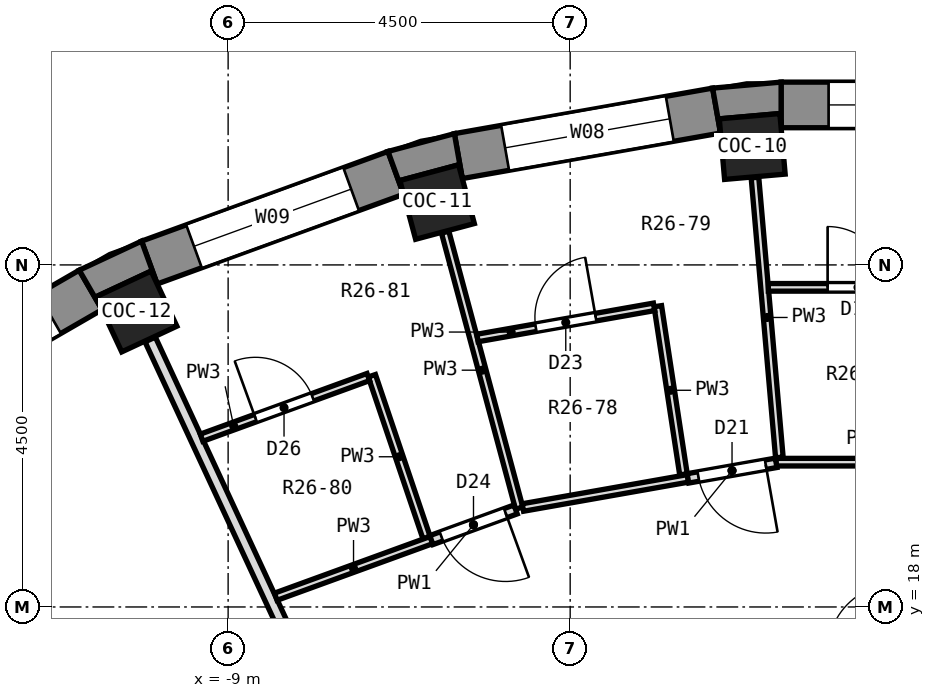
"""IFC4 building model, lengths in metres.
Left out: names, types, materials, properties, quantities, classifications, styles, units other than length and angle.
Written with IfcOpenShell. Run it as: python <this file> out.ifc"""

import sys

from ifc_helpers import new_model, si_unit, direction, frame, frame_2d, origin, origin_2d, place, context, subcontext, project, spatial, polyline, rectangle, outline, extrude, element, fill, save


model = new_model("IFC4")
c1 = context("Model", 3, precision=1e-05, world=origin(), true_north=direction((0.0, 1.0)))
c2 = subcontext(c1, "Body", "Model", "MODEL_VIEW")
j1 = project(units=[si_unit("LENGTHUNIT", "METRE"), si_unit("PLANEANGLEUNIT", "RADIAN")], contexts=[c1])
p1 = place(None, origin())
s1 = spatial("IfcSite", under=j1, at=p1, CompositionType="ELEMENT")
p2 = place(p1, origin())
s2 = spatial("IfcBuilding", under=s1, at=p2, CompositionType="ELEMENT")
p3 = place(p2, frame((0.0, 0.0, 170.7)))
s3 = spatial("IfcBuildingStorey", under=s2, at=p3, CompositionType="ELEMENT", Elevation=170.7)
for number, where, z_axis, x_axis in (
    (1, (-2.105, 24.058, 0.0), (0.0, 0.0, 1.0), (-0.087, 0.996, 0.0)),
    (2, (-6.25, 23.327, 0.0), (0.0, 0.0, 1.0), (-0.259, 0.966, 0.0)),
    (3, (-10.206, 21.887, 0.0), (0.0, 0.0, 1.0), (-0.423, 0.906, 0.0)),
):
    element("IfcColumn", number, at=place(p3, frame(where, z_axis=z_axis, x_axis=x_axis)), inside=s3, PredefinedType="COLUMN", context=c2, shape_type="SweptSolid", body=[
        extrude(rectangle(XDim=0.8, YDim=0.8, at=origin_2d()), origin(), (0.0, 0.0, 1.0), 3.3),
    ])
p4 = place(p3, frame((1.725, 24.605, 0.0), z_axis=(0.0, 0.0, 1.0), x_axis=(-1.0, 0.0, 0.0)))
e4 = element("IfcWall", 4, at=p4, inside=s3, PredefinedType="SOLIDWALL", context=c2, shape_type="SweptSolid", body=[
    extrude(rectangle(XDim=3.45, YDim=0.6, at=frame_2d((1.725, 0.0))), origin(), (0.0, 0.0, 1.0), 2.85),
])
p5 = place(p4, frame((0.625, 0.0, 0.9)))
e5 = element("IfcOpeningElement", 5, at=p5, cuts=e4, PredefinedType="OPENING", context=c2, shape_type="SweptSolid", body=[
    extrude(rectangle(XDim=2.2, YDim=1.8, at=frame_2d((1.1, 0.9))), frame((0.0, 0.312, 0.0), z_axis=(0.0, -1.0, 0.0), x_axis=(1.0, 0.0, 0.0)), (0.0, 0.0, 1.0), 0.624),
])
p6 = place(p3, frame((-2.574, 24.531, 0.0), z_axis=(0.0, 0.0, 1.0), x_axis=(-0.984814892183, -0.173607684551, 0.0)))
e6 = element("IfcWall", 6, at=p6, inside=s3, PredefinedType="SOLIDWALL", context=c2, shape_type="SweptSolid", body=[
    extrude(rectangle(XDim=3.45, YDim=0.6, at=frame_2d((1.725, 0.0))), origin(), (0.0, 0.0, 1.0), 2.85),
])
p7 = place(p6, frame((0.625, 0.0, 0.9)))
e7 = element("IfcOpeningElement", 7, at=p7, cuts=e6, PredefinedType="OPENING", context=c2, shape_type="SweptSolid", body=[
    extrude(rectangle(XDim=2.2, YDim=1.8, at=frame_2d((1.1, 0.9))), frame((0.0, 0.312, 0.0), z_axis=(0.0, -1.0, 0.0), x_axis=(1.0, 0.0, 0.0)), (0.0, 0.0, 1.0), 0.624),
])
p8 = place(p3, frame((-6.794, 23.711, 0.0), z_axis=(0.0, 0.0, 1.0), x_axis=(-0.93968799822, -0.342032843455, 0.0)))
e8 = element("IfcWall", 8, at=p8, inside=s3, PredefinedType="SOLIDWALL", context=c2, shape_type="SweptSolid", body=[
    extrude(rectangle(XDim=3.45, YDim=0.6, at=frame_2d((1.725, 0.0))), origin(), (0.0, 0.0, 1.0), 2.85),
])
p9 = place(p8, frame((0.625, 0.0, 0.9)))
e9 = element("IfcOpeningElement", 9, at=p9, cuts=e8, PredefinedType="OPENING", context=c2, shape_type="SweptSolid", body=[
    extrude(rectangle(XDim=2.2, YDim=1.8, at=frame_2d((1.1, 0.9))), frame((0.0, 0.312, 0.0), z_axis=(0.0, -1.0, 0.0), x_axis=(1.0, 0.0, 0.0)), (0.0, 0.0, 1.0), 0.624),
])
p10 = place(p3, frame((-10.809, 22.171, 0.0), z_axis=(0.0, 0.0, 1.0), x_axis=(-0.86602648383, -0.499998129301, 0.0)))
e10 = element("IfcWall", 10, at=p10, inside=s3, PredefinedType="SOLIDWALL", context=c2, shape_type="SweptSolid", body=[
    extrude(rectangle(XDim=3.45, YDim=0.6, at=frame_2d((1.725, 0.0))), origin(), (0.0, 0.0, 1.0), 2.85),
])
p11 = place(p10, frame((0.625, 0.0, 0.9)))
e11 = element("IfcOpeningElement", 11, at=p11, cuts=e10, PredefinedType="OPENING", context=c2, shape_type="SweptSolid", body=[
    extrude(rectangle(XDim=2.2, YDim=1.8, at=frame_2d((1.1, 0.9))), frame((0.0, 0.312, 0.0), z_axis=(0.0, -1.0, 0.0), x_axis=(1.0, 0.0, 0.0)), (0.0, 0.0, 1.0), 0.624),
])
p12 = place(p3, origin())
e12 = element("IfcWall", 12, at=p12, inside=s3, PredefinedType="SOLIDWALL", context=c2, shape_type="SweptSolid", body=[
    extrude(outline(polyline([(-1.725, 24.905), (-2.626, 24.826), (-2.522, 24.235), (-2.538, 24.422), (-1.741, 24.491), (-1.725, 24.305), (-1.725, 24.905)])), origin(), (0.0, 0.0, 1.0), 2.85),
])
p13 = place(p3, origin())
e13 = element("IfcWall", 13, at=p13, inside=s3, PredefinedType="SOLIDWALL", context=c2, shape_type="SweptSolid", body=[
    extrude(outline(polyline([(-6.023, 24.227), (-6.897, 23.993), (-6.692, 23.429), (-6.74, 23.61), (-5.968, 23.817), (-5.919, 23.636), (-6.023, 24.227)])), origin(), (0.0, 0.0, 1.0), 2.85),
])
p14 = place(p3, origin())
e14 = element("IfcWall", 14, at=p14, inside=s3, PredefinedType="SOLIDWALL", context=c2, shape_type="SweptSolid", body=[
    extrude(outline(polyline([(-10.959, 22.431), (-10.659, 21.911), (-10.738, 22.081), (-10.013, 22.419), (-9.934, 22.249), (-10.139, 22.813), (-10.959, 22.431)])), origin(), (0.0, 0.0, 1.0), 2.85),
])
p15 = place(p3, frame((-2.069, 23.65, 0.0), z_axis=(0.0, 0.0, 1.0), x_axis=(0.086783514493, -0.996227193773, 0.0)))
e15 = element("IfcWall", 15, at=p15, inside=s3, PredefinedType="PARTITIONING", context=c2, shape_type="SweptSolid", body=[
    extrude(rectangle(XDim=3.697, YDim=0.1, at=frame_2d((1.848, 0.0))), origin(), (0.0, 0.0, 1.0), 2.85),
])
p16 = place(p3, frame((-3.347, 21.957, 0.0), z_axis=(0.0, 0.0, 1.0), x_axis=(0.150778111259, -0.988567631053, 0.0)))
e16 = element("IfcWall", 16, at=p16, inside=s3, PredefinedType="PARTITIONING", context=c2, shape_type="SweptSolid", body=[
    extrude(rectangle(XDim=2.238, YDim=0.1, at=frame_2d((1.119, 0.0))), origin(), (0.0, 0.0, 1.0), 2.85),
])
p17 = place(p3, frame((-6.145, 22.931, 0.0), z_axis=(0.0, 0.0, 1.0), x_axis=(0.259065026248, -0.965859882268, 0.0)))
e17 = element("IfcWall", 17, at=p17, inside=s3, PredefinedType="PARTITIONING", context=c2, shape_type="SweptSolid", body=[
    extrude(rectangle(XDim=3.759, YDim=0.1, at=frame_2d((1.88, 0.0))), origin(), (0.0, 0.0, 1.0), 2.85),
])
p18 = place(p3, frame((-7.109, 21.042, 0.0), z_axis=(0.0, 0.0, 1.0), x_axis=(0.320001473527, -0.947417044886, 0.0)))
e18 = element("IfcWall", 18, at=p18, inside=s3, PredefinedType="PARTITIONING", context=c2, shape_type="SweptSolid", body=[
    extrude(rectangle(XDim=2.25, YDim=0.1, at=frame_2d((1.125, 0.0))), origin(), (0.0, 0.0, 1.0), 2.85),
])
p19 = place(p3, frame((-10.026, 21.519, 0.0), z_axis=(0.0, 0.0, 1.0), x_axis=(0.420738120606, -0.907182139302, 0.0)))
e19 = element("IfcWall", 19, at=p19, inside=s3, PredefinedType="PARTITIONING", context=c2, shape_type="SweptSolid", body=[
    extrude(rectangle(XDim=8.42, YDim=0.15, at=frame_2d((4.21, 0.0))), origin(), (0.0, 0.0, 1.0), 2.85),
])
p20 = place(p3, frame((-1.792, 19.905, 0.0), z_axis=(0.0, 0.0, 1.0), x_axis=(1.0, 0.0, 0.0)))
e20 = element("IfcWall", 20, at=p20, inside=s3, PredefinedType="PARTITIONING", context=c2, shape_type="SweptSolid", body=[
    extrude(rectangle(XDim=2.305, YDim=0.1, at=frame_2d((1.152, 0.0))), origin(), (0.0, 0.0, 1.0), 2.85),
])
p21 = place(p3, frame((-1.893, 22.205, 0.0), z_axis=(0.0, 0.0, 1.0), x_axis=(1.0, 0.0, 0.0)))
e21 = element("IfcWall", 21, at=p21, inside=s3, PredefinedType="PARTITIONING", context=c2, shape_type="SweptSolid", body=[
    extrude(rectangle(XDim=2.41, YDim=0.1, at=frame_2d((1.205, 0.0))), origin(), (0.0, 0.0, 1.0), 2.85),
])
p22 = place(p21, frame((0.78, 0.0, 0.0)))
e22 = element("IfcOpeningElement", 22, at=p22, cuts=e21, PredefinedType="OPENING", context=c2, shape_type="SweptSolid", body=[
    extrude(rectangle(XDim=0.8, YDim=2.1, at=frame_2d((0.4, 1.05))), frame((0.0, 0.062, 0.0), z_axis=(0.0, -1.0, 0.0), x_axis=(1.0, 0.0, 0.0)), (0.0, 0.0, 1.0), 0.124),
])
p23 = place(p3, frame((-5.122, 19.309, 0.0), z_axis=(0.0, 0.0, 1.0), x_axis=(0.984790246942, 0.173747430277, 0.0)))
e23 = element("IfcWall", 23, at=p23, inside=s3, PredefinedType="PARTITIONING", context=c2, shape_type="SweptSolid", body=[
    extrude(rectangle(XDim=2.205, YDim=0.1, at=frame_2d((1.102, 0.0))), origin(), (0.0, 0.0, 1.0), 2.85),
])
p24 = place(p3, frame((-2.951, 19.692, 0.0), z_axis=(0.0, 0.0, 1.0), x_axis=(0.984810663307, 0.173631671755, 0.0)))
e24 = element("IfcWall", 24, at=p24, inside=s3, PredefinedType="PARTITIONING", context=c2, shape_type="SweptSolid", body=[
    extrude(rectangle(XDim=1.178, YDim=0.125, at=frame_2d((0.589, 0.0))), origin(), (0.0, 0.0, 1.0), 2.85),
])
p25 = place(p24, frame((0.139, 0.0, 0.0)))
e25 = element("IfcOpeningElement", 25, at=p25, cuts=e24, PredefinedType="OPENING", context=c2, shape_type="SweptSolid", body=[
    extrude(rectangle(XDim=0.9, YDim=2.1, at=frame_2d((0.45, 1.05))), frame((0.0, 0.074, 0.0), z_axis=(0.0, -1.0, 0.0), x_axis=(1.0, 0.0, 0.0)), (0.0, 0.0, 1.0), 0.149),
])
p26 = place(p3, frame((-5.72, 21.539, 0.0), z_axis=(0.0, 0.0, 1.0), x_axis=(0.984809591131, 0.173637752855, 0.0)))
e26 = element("IfcWall", 26, at=p26, inside=s3, PredefinedType="PARTITIONING", context=c2, shape_type="SweptSolid", body=[
    extrude(rectangle(XDim=2.359, YDim=0.1, at=frame_2d((1.18, 0.0))), origin(), (0.0, 0.0, 1.0), 2.85),
])
p27 = place(p26, frame((0.78, 0.0, 0.0)))
e27 = element("IfcOpeningElement", 27, at=p27, cuts=e26, PredefinedType="OPENING", context=c2, shape_type="SweptSolid", body=[
    extrude(rectangle(XDim=0.8, YDim=2.1, at=frame_2d((0.4, 1.05))), frame((0.0, 0.062, 0.0), z_axis=(0.0, -1.0, 0.0), x_axis=(1.0, 0.0, 0.0)), (0.0, 0.0, 1.0), 0.124),
])
p28 = place(p3, frame((-8.374, 18.135, 0.0), z_axis=(0.0, 0.0, 1.0), x_axis=(0.939750886848, 0.341860016189, 0.0)))
e28 = element("IfcWall", 28, at=p28, inside=s3, PredefinedType="PARTITIONING", context=c2, shape_type="SweptSolid", body=[
    extrude(rectangle(XDim=2.179, YDim=0.1, at=frame_2d((1.089, 0.0))), origin(), (0.0, 0.0, 1.0), 2.85),
])
p29 = place(p3, frame((-6.326, 18.88, 0.0), z_axis=(0.0, 0.0, 1.0), x_axis=(0.939672449317, 0.342075558896, 0.0)))
e29 = element("IfcWall", 29, at=p29, inside=s3, PredefinedType="PARTITIONING", context=c2, shape_type="SweptSolid", body=[
    extrude(rectangle(XDim=1.179, YDim=0.125, at=frame_2d((0.589, 0.0))), origin(), (0.0, 0.0, 1.0), 2.85),
])
p30 = place(p29, frame((0.139, 0.0, 0.0)))
e30 = element("IfcOpeningElement", 30, at=p30, cuts=e29, PredefinedType="OPENING", context=c2, shape_type="SweptSolid", body=[
    extrude(rectangle(XDim=0.9, YDim=2.1, at=frame_2d((0.45, 1.05))), frame((0.0, 0.074, 0.0), z_axis=(0.0, -1.0, 0.0), x_axis=(1.0, 0.0, 0.0)), (0.0, 0.0, 1.0), 0.149),
])
p31 = place(p3, frame((-9.35, 20.227, 0.0), z_axis=(0.0, 0.0, 1.0), x_axis=(0.939701781882, 0.341994972371, 0.0)))
e31 = element("IfcWall", 31, at=p31, inside=s3, PredefinedType="PARTITIONING", context=c2, shape_type="SweptSolid", body=[
    extrude(rectangle(XDim=2.334, YDim=0.1, at=frame_2d((1.167, 0.0))), origin(), (0.0, 0.0, 1.0), 2.85),
])
p32 = place(p31, frame((0.755, 0.0, 0.0)))
e32 = element("IfcOpeningElement", 32, at=p32, cuts=e31, PredefinedType="OPENING", context=c2, shape_type="SweptSolid", body=[
    extrude(rectangle(XDim=0.8, YDim=2.1, at=frame_2d((0.4, 1.05))), frame((0.0, 0.062, 0.0), z_axis=(0.0, -1.0, 0.0), x_axis=(1.0, 0.0, 0.0)), (0.0, 0.0, 1.0), 0.124),
])
p33 = place(p5, origin())
e33 = element("IfcWindow", 33, at=p33, inside=s3, PartitioningType="SINGLE_PANEL", PredefinedType="WINDOW", context=c2, shape_type="SweptSolid", body=[
    extrude(rectangle(XDim=2.2, YDim=1.8, at=frame_2d((1.1, 0.9))), frame((0.0, 0.18, 0.0), z_axis=(0.0, -1.0, 0.0), x_axis=(1.0, 0.0, 0.0)), (0.0, 0.0, 1.0), 0.06),
])
fill(e5, e33)
p34 = place(p7, origin())
e34 = element("IfcWindow", 34, at=p34, inside=s3, PartitioningType="SINGLE_PANEL", PredefinedType="WINDOW", context=c2, shape_type="SweptSolid", body=[
    extrude(rectangle(XDim=2.2, YDim=1.8, at=frame_2d((1.1, 0.9))), frame((0.0, 0.18, 0.0), z_axis=(0.0, -1.0, 0.0), x_axis=(1.0, 0.0, 0.0)), (0.0, 0.0, 1.0), 0.06),
])
fill(e7, e34)
p35 = place(p9, origin())
e35 = element("IfcWindow", 35, at=p35, inside=s3, PartitioningType="SINGLE_PANEL", PredefinedType="WINDOW", context=c2, shape_type="SweptSolid", body=[
    extrude(rectangle(XDim=2.2, YDim=1.8, at=frame_2d((1.1, 0.9))), frame((0.0, 0.18, 0.0), z_axis=(0.0, -1.0, 0.0), x_axis=(1.0, 0.0, 0.0)), (0.0, 0.0, 1.0), 0.06),
])
fill(e9, e35)
p36 = place(p11, origin())
e36 = element("IfcWindow", 36, at=p36, inside=s3, PartitioningType="SINGLE_PANEL", PredefinedType="WINDOW", context=c2, shape_type="SweptSolid", body=[
    extrude(rectangle(XDim=2.2, YDim=1.8, at=frame_2d((1.1, 0.9))), frame((0.0, 0.18, 0.0), z_axis=(0.0, -1.0, 0.0), x_axis=(1.0, 0.0, 0.0)), (0.0, 0.0, 1.0), 0.06),
])
fill(e11, e36)
p37 = place(p22, origin())
e37 = element("IfcDoor", 37, at=p37, inside=s3, OperationType="SINGLE_SWING_LEFT", PredefinedType="DOOR", context=c2, shape_type="SweptSolid", body=[
    extrude(rectangle(XDim=0.8, YDim=2.1, at=frame_2d((0.4, 1.05))), frame((0.0, 0.025, 0.0), z_axis=(0.0, -1.0, 0.0), x_axis=(1.0, 0.0, 0.0)), (0.0, 0.0, 1.0), 0.05),
])
fill(e22, e37)
p38 = place(p25, frame((0.9, 0.0, 0.0), z_axis=(0.0, 0.0, 1.0), x_axis=(-1.0, 0.0, 0.0)))
e38 = element("IfcDoor", 38, at=p38, inside=s3, OperationType="SINGLE_SWING_LEFT", PredefinedType="DOOR", context=c2, shape_type="SweptSolid", body=[
    extrude(rectangle(XDim=0.9, YDim=2.1, at=frame_2d((0.45, 1.05))), frame((0.0, 0.025, 0.0), z_axis=(0.0, -1.0, 0.0), x_axis=(1.0, 0.0, 0.0)), (0.0, 0.0, 1.0), 0.05),
])
fill(e25, e38)
p39 = place(p27, origin())
e39 = element("IfcDoor", 39, at=p39, inside=s3, OperationType="SINGLE_SWING_RIGHT", PredefinedType="DOOR", context=c2, shape_type="SweptSolid", body=[
    extrude(rectangle(XDim=0.8, YDim=2.1, at=frame_2d((0.4, 1.05))), frame((0.0, 0.025, 0.0), z_axis=(0.0, -1.0, 0.0), x_axis=(1.0, 0.0, 0.0)), (0.0, 0.0, 1.0), 0.05),
])
fill(e27, e39)
p40 = place(p30, frame((0.9, 0.0, 0.0), z_axis=(0.0, 0.0, 1.0), x_axis=(-1.0, 0.0, 0.0)))
e40 = element("IfcDoor", 40, at=p40, inside=s3, OperationType="SINGLE_SWING_LEFT", PredefinedType="DOOR", context=c2, shape_type="SweptSolid", body=[
    extrude(rectangle(XDim=0.9, YDim=2.1, at=frame_2d((0.45, 1.05))), frame((0.0, 0.025, 0.0), z_axis=(0.0, -1.0, 0.0), x_axis=(1.0, 0.0, 0.0)), (0.0, 0.0, 1.0), 0.05),
])
fill(e30, e40)
p41 = place(p32, origin())
e41 = element("IfcDoor", 41, at=p41, inside=s3, OperationType="SINGLE_SWING_LEFT", PredefinedType="DOOR", context=c2, shape_type="SweptSolid", body=[
    extrude(rectangle(XDim=0.8, YDim=2.1, at=frame_2d((0.4, 1.05))), frame((0.0, 0.025, 0.0), z_axis=(0.0, -1.0, 0.0), x_axis=(1.0, 0.0, 0.0)), (0.0, 0.0, 1.0), 0.05),
])
fill(e32, e41)
save(model, sys.argv[1])
